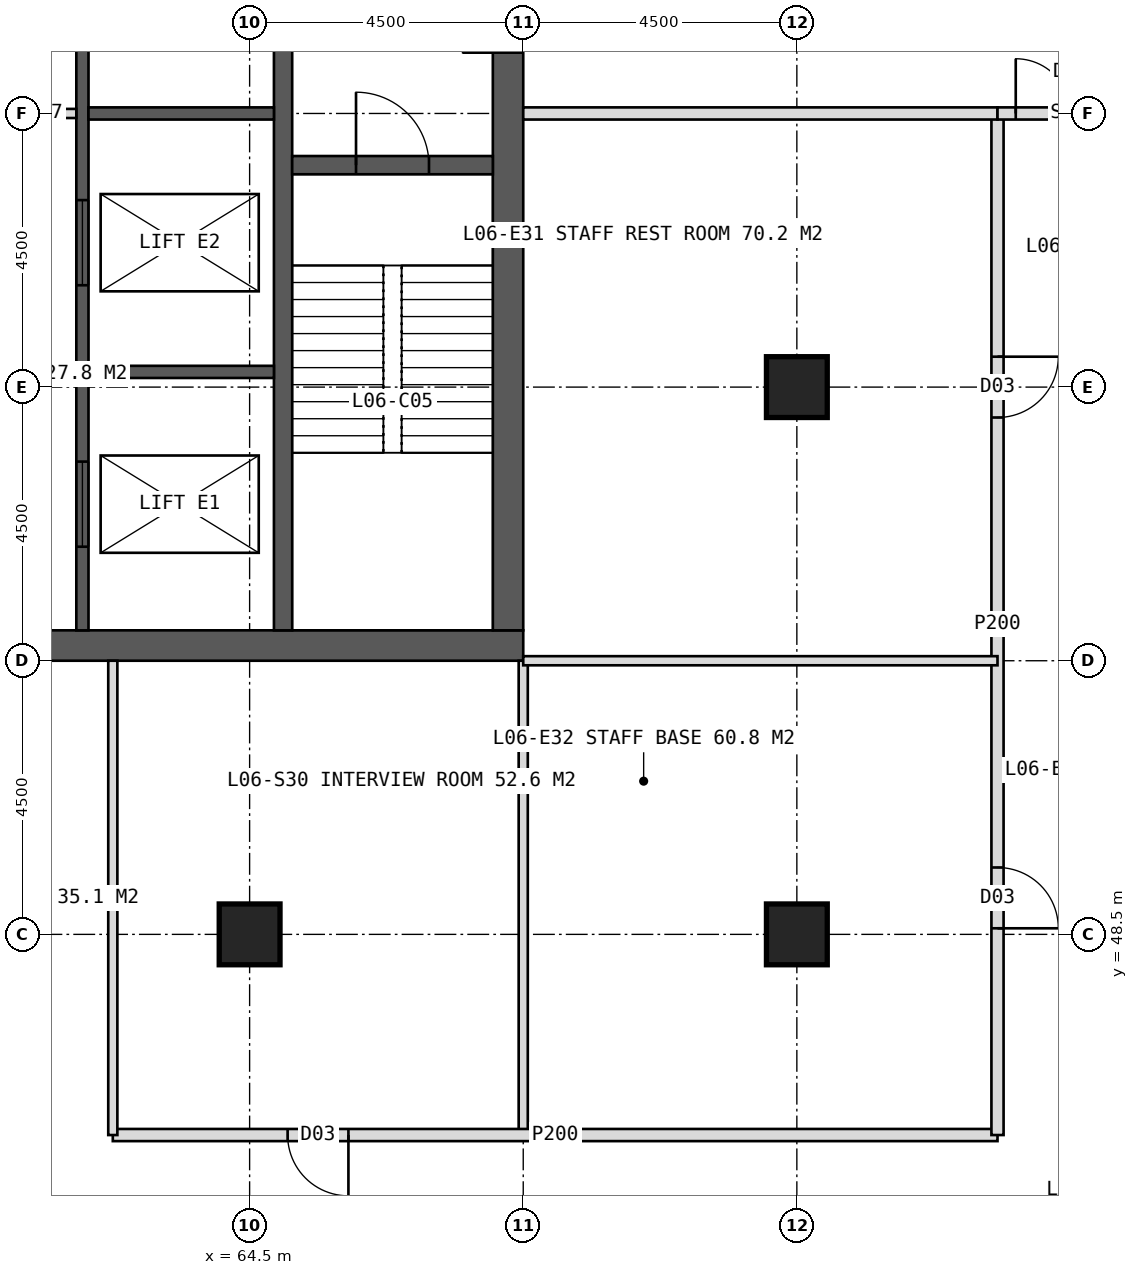
"""IFC4 building model, lengths in metres.
Left out: names, types, materials, properties, quantities, classifications, styles, units other than length and angle.
Written with IfcOpenShell. Run it as: python <this file> out.ifc"""

import sys

from ifc_helpers import new_model, si_unit, direction, frame, frame_2d, origin, origin_2d, place, context, subcontext, project, spatial, rectangle, hollow_rectangle, extrude, element, fill, save


model = new_model("IFC4")
c1 = context("Model", 3, precision=1e-05, world=origin(), true_north=direction((0.0, 1.0)))
c2 = subcontext(c1, "Body", "Model", "MODEL_VIEW")
j1 = project(units=[si_unit("LENGTHUNIT", "METRE"), si_unit("PLANEANGLEUNIT", "RADIAN")], contexts=[c1])
p1 = place(None, origin())
s1 = spatial("IfcSite", under=j1, at=p1, CompositionType="ELEMENT")
p2 = place(p1, origin())
s2 = spatial("IfcBuilding", under=s1, at=p2, CompositionType="ELEMENT")
p3 = place(p2, frame((0.0, 0.0, 31.0)))
s3 = spatial("IfcBuildingStorey", under=s2, at=p3, CompositionType="ELEMENT", Elevation=31.0)
p4 = place(p3, frame((51.0, 53.25, 0.0), z_axis=(0.0, 0.0, 1.0), x_axis=(1.0, 0.0, 0.0)))
e1 = element("IfcWall", 1, at=p4, inside=s3, PredefinedType="SHEAR", context=c2, shape_type="SweptSolid", body=[
    extrude(rectangle(XDim=18.0, YDim=0.5, at=frame_2d((9.0, 0.0))), origin(), (0.0, 0.0, 1.0), 4.0),
])
p5 = place(p4, frame((8.1, 0.0, 0.0)))
e2 = element("IfcOpeningElement", 2, at=p5, cuts=e1, PredefinedType="OPENING", context=c2, shape_type="SweptSolid", body=[
    extrude(rectangle(XDim=1.8, YDim=2.2, at=frame_2d((0.9, 1.1))), frame((0.0, 0.26, 0.0), z_axis=(0.0, -1.0, 0.0), x_axis=(1.0, 0.0, 0.0)), (0.0, 0.0, 1.0), 0.52),
])
p6 = place(p3, frame((68.75, 53.5, 0.0), z_axis=(0.0, 0.0, 1.0), x_axis=(0.0, 1.0, 0.0)))
e3 = element("IfcWall", 3, at=p6, inside=s3, PredefinedType="SHEAR", context=c2, shape_type="SweptSolid", body=[
    extrude(rectangle(XDim=17.0, YDim=0.5, at=frame_2d((8.5, 0.0))), origin(), (0.0, 0.0, 1.0), 4.0),
])
p7 = place(p6, frame((9.5, 0.0, 0.0)))
e4 = element("IfcOpeningElement", 4, at=p7, cuts=e3, PredefinedType="OPENING", context=c2, shape_type="SweptSolid", body=[
    extrude(rectangle(XDim=1.5, YDim=2.2, at=frame_2d((0.75, 1.1))), frame((0.0, 0.26, 0.0), z_axis=(0.0, -1.0, 0.0), x_axis=(1.0, 0.0, 0.0)), (0.0, 0.0, 1.0), 0.52),
])
p8 = place(p3, frame((65.05, 53.5, 0.0), z_axis=(0.0, 0.0, 1.0), x_axis=(0.0, 1.0, 0.0)))
e5 = element("IfcWall", 5, at=p8, inside=s3, PredefinedType="SHEAR", context=c2, shape_type="SweptSolid", body=[
    extrude(rectangle(XDim=17.0, YDim=0.3, at=frame_2d((8.5, 0.0))), origin(), (0.0, 0.0, 1.0), 4.0),
])
p9 = place(p3, frame((61.75, 53.5, 0.0), z_axis=(0.0, 0.0, 1.0), x_axis=(0.0, 1.0, 0.0)))
e6 = element("IfcWall", 6, at=p9, inside=s3, PredefinedType="SHEAR", context=c2, shape_type="SweptSolid", body=[
    extrude(rectangle(XDim=17.0, YDim=0.2, at=frame_2d((8.5, 0.0))), origin(), (0.0, 0.0, 1.0), 4.0),
])
p10 = place(p9, frame((1.375, 0.0, 0.0)))
e7 = element("IfcOpeningElement", 7, at=p10, cuts=e6, PredefinedType="OPENING", context=c2, shape_type="SweptSolid", body=[
    extrude(rectangle(XDim=1.4, YDim=2.2, at=frame_2d((0.7, 1.1))), frame((0.0, 0.11, 0.0), z_axis=(0.0, -1.0, 0.0), x_axis=(1.0, 0.0, 0.0)), (0.0, 0.0, 1.0), 0.22),
])
p11 = place(p9, frame((5.675, 0.0, 0.0)))
e8 = element("IfcOpeningElement", 8, at=p11, cuts=e6, PredefinedType="OPENING", context=c2, shape_type="SweptSolid", body=[
    extrude(rectangle(XDim=1.4, YDim=2.2, at=frame_2d((0.7, 1.1))), frame((0.0, 0.11, 0.0), z_axis=(0.0, -1.0, 0.0), x_axis=(1.0, 0.0, 0.0)), (0.0, 0.0, 1.0), 0.22),
])
for number, where, z_axis, x_axis in (
    (9, (61.85, 57.75, 0.0), (0.0, 0.0, 1.0), (1.0, 0.0, 0.0)),
    (10, (61.85, 62.0, 0.0), (0.0, 0.0, 1.0), (1.0, 0.0, 0.0)),
):
    element("IfcWall", number, at=place(p3, frame(where, z_axis=z_axis, x_axis=x_axis)), inside=s3, PredefinedType="SHEAR", context=c2, shape_type="SweptSolid", body=[
        extrude(rectangle(XDim=3.05, YDim=0.2, at=frame_2d((1.525, 0.0))), origin(), (0.0, 0.0, 1.0), 4.0),
    ])
p12 = place(p3, frame((65.2, 61.15, 0.0), z_axis=(0.0, 0.0, 1.0), x_axis=(1.0, 0.0, 0.0)))
e11 = element("IfcWall", 11, at=p12, inside=s3, PredefinedType="SHEAR", context=c2, shape_type="SweptSolid", body=[
    extrude(rectangle(XDim=3.3, YDim=0.3, at=frame_2d((1.65, 0.0))), origin(), (0.0, 0.0, 1.0), 4.0),
])
p13 = place(p12, frame((1.05, 0.0, 0.0)))
e12 = element("IfcOpeningElement", 12, at=p13, cuts=e11, PredefinedType="OPENING", context=c2, shape_type="SweptSolid", body=[
    extrude(rectangle(XDim=1.2, YDim=2.1, at=frame_2d((0.6, 1.05))), frame((0.0, 0.16, 0.0), z_axis=(0.0, -1.0, 0.0), x_axis=(1.0, 0.0, 0.0)), (0.0, 0.0, 1.0), 0.32),
])
for number, where, z_axis, x_axis in (
    (13, (73.5, 48.5, 0.0), (0.0, 0.0, 1.0), (1.0, 0.0, 0.0)),
    (14, (64.5, 48.5, 0.0), (0.0, 0.0, 1.0), (1.0, 0.0, 0.0)),
    (15, (73.5, 57.5, 0.0), (0.0, 0.0, 1.0), (1.0, 0.0, 0.0)),
):
    element("IfcColumn", number, at=place(p3, frame(where, z_axis=z_axis, x_axis=x_axis)), inside=s3, PredefinedType="COLUMN", context=c2, shape_type="SweptSolid", body=[
        extrude(hollow_rectangle(XDim=1.0, YDim=1.0, WallThickness=0.1, at=origin_2d()), origin(), (0.0, 0.0, 1.0), 4.0),
    ])
p14 = place(p3, frame((69.0, 53.0, 0.0), z_axis=(0.0, 0.0, 1.0), x_axis=(0.0, -1.0, 0.0)))
e16 = element("IfcWall", 16, at=p14, inside=s3, PredefinedType="PARTITIONING", context=c2, shape_type="SweptSolid", body=[
    extrude(rectangle(XDim=7.8, YDim=0.15, at=frame_2d((3.9, 0.0))), origin(), (0.0, 0.0, 1.0), 3.75),
])
p15 = place(p3, frame((76.8, 45.2, 0.0), z_axis=(0.0, 0.0, 1.0), x_axis=(-1.0, 0.0, 0.0)))
e17 = element("IfcWall", 17, at=p15, inside=s3, PredefinedType="PARTITIONING", context=c2, shape_type="SweptSolid", body=[
    extrude(rectangle(XDim=14.55, YDim=0.2, at=frame_2d((7.275, 0.0))), origin(), (0.0, 0.0, 1.0), 3.75),
])
p16 = place(p15, frame((10.675, 0.0, 0.0)))
e18 = element("IfcOpeningElement", 18, at=p16, cuts=e17, PredefinedType="OPENING", context=c2, shape_type="SweptSolid", body=[
    extrude(rectangle(XDim=1.0, YDim=2.1, at=frame_2d((0.5, 1.05))), frame((0.0, 0.11, 0.0), z_axis=(0.0, -1.0, 0.0), x_axis=(1.0, 0.0, 0.0)), (0.0, 0.0, 1.0), 0.22),
])
p17 = place(p3, frame((62.25, 53.0, 0.0), z_axis=(0.0, 0.0, 1.0), x_axis=(0.0, -1.0, 0.0)))
e19 = element("IfcWall", 19, at=p17, inside=s3, PredefinedType="PARTITIONING", context=c2, shape_type="SweptSolid", body=[
    extrude(rectangle(XDim=7.8, YDim=0.15, at=frame_2d((3.9, 0.0))), origin(), (0.0, 0.0, 1.0), 3.75),
])
p18 = place(p3, frame((76.8, 62.0, 0.0), z_axis=(0.0, 0.0, 1.0), x_axis=(0.0, -1.0, 0.0)))
e20 = element("IfcWall", 20, at=p18, inside=s3, PredefinedType="PARTITIONING", context=c2, shape_type="SweptSolid", body=[
    extrude(rectangle(XDim=16.8, YDim=0.2, at=frame_2d((8.4, 0.0))), origin(), (0.0, 0.0, 1.0), 3.75),
])
p19 = place(p18, frame((4.0, 0.0, 0.0)))
e21 = element("IfcOpeningElement", 21, at=p19, cuts=e20, PredefinedType="OPENING", context=c2, shape_type="SweptSolid", body=[
    extrude(rectangle(XDim=1.0, YDim=2.1, at=frame_2d((0.5, 1.05))), frame((0.0, 0.11, 0.0), z_axis=(0.0, -1.0, 0.0), x_axis=(1.0, 0.0, 0.0)), (0.0, 0.0, 1.0), 0.22),
])
p20 = place(p18, frame((12.4, 0.0, 0.0)))
e22 = element("IfcOpeningElement", 22, at=p20, cuts=e20, PredefinedType="OPENING", context=c2, shape_type="SweptSolid", body=[
    extrude(rectangle(XDim=1.0, YDim=2.1, at=frame_2d((0.5, 1.05))), frame((0.0, 0.11, 0.0), z_axis=(0.0, -1.0, 0.0), x_axis=(1.0, 0.0, 0.0)), (0.0, 0.0, 1.0), 0.22),
])
p21 = place(p3, frame((69.0, 62.0, 0.0), z_axis=(0.0, 0.0, 1.0), x_axis=(1.0, 0.0, 0.0)))
e23 = element("IfcWall", 23, at=p21, inside=s3, PredefinedType="SOLIDWALL", context=c2, shape_type="SweptSolid", body=[
    extrude(rectangle(XDim=7.8, YDim=0.2, at=frame_2d((3.9, 0.0))), origin(), (0.0, 0.0, 1.0), 2.75),
])
p22 = place(p3, frame((69.0, 53.0, 0.0), z_axis=(0.0, 0.0, 1.0), x_axis=(1.0, 0.0, 0.0)))
e24 = element("IfcWall", 24, at=p22, inside=s3, PredefinedType="PARTITIONING", context=c2, shape_type="SweptSolid", body=[
    extrude(rectangle(XDim=7.8, YDim=0.15, at=frame_2d((3.9, 0.0))), origin(), (0.0, 0.0, 1.0), 3.75),
])
p23 = place(p3, frame((76.8, 62.0, 0.0), z_axis=(0.0, 0.0, 1.0), x_axis=(1.0, 0.0, 0.0)))
e25 = element("IfcWall", 25, at=p23, inside=s3, PredefinedType="SOLIDWALL", context=c2, shape_type="SweptSolid", body=[
    extrude(rectangle(XDim=2.7, YDim=0.2, at=frame_2d((1.35, 0.0))), origin(), (0.0, 0.0, 1.0), 2.75),
])
p24 = place(p23, frame((0.3, 0.0, 0.0)))
e26 = element("IfcOpeningElement", 26, at=p24, cuts=e25, PredefinedType="OPENING", context=c2, shape_type="SweptSolid", body=[
    extrude(rectangle(XDim=1.8, YDim=2.2, at=frame_2d((0.9, 1.1))), frame((0.0, 0.11, 0.0), z_axis=(0.0, -1.0, 0.0), x_axis=(1.0, 0.0, 0.0)), (0.0, 0.0, 1.0), 0.22),
])
p25 = place(p3, frame((58.35, 62.0, 0.0), z_axis=(0.0, 0.0, 1.0), x_axis=(1.0, 0.0, 0.0)))
e27 = element("IfcWall", 27, at=p25, inside=s3, PredefinedType="PARTITIONING", context=c2, shape_type="SweptSolid", body=[
    extrude(rectangle(XDim=3.3, YDim=0.15, at=frame_2d((1.65, 0.0))), origin(), (0.0, 0.0, 1.0), 3.75),
])
p26 = place(p25, frame((1.15, 0.0, 0.0)))
e28 = element("IfcOpeningElement", 28, at=p26, cuts=e27, PredefinedType="OPENING", context=c2, shape_type="SweptSolid", body=[
    extrude(rectangle(XDim=1.0, YDim=2.1, at=frame_2d((0.5, 1.05))), frame((0.0, 0.085, 0.0), z_axis=(0.0, -1.0, 0.0), x_axis=(1.0, 0.0, 0.0)), (0.0, 0.0, 1.0), 0.17),
])
p27 = place(p16, origin())
e29 = element("IfcDoor", 29, at=p27, inside=s3, OperationType="SINGLE_SWING_LEFT", PredefinedType="DOOR", context=c2, shape_type="SweptSolid", body=[
    extrude(rectangle(XDim=1.0, YDim=2.1, at=frame_2d((0.5, 1.05))), frame((0.0, 0.025, 0.0), z_axis=(0.0, -1.0, 0.0), x_axis=(1.0, 0.0, 0.0)), (0.0, 0.0, 1.0), 0.05),
])
fill(e18, e29)
p28 = place(p19, origin())
e30 = element("IfcDoor", 30, at=p28, inside=s3, OperationType="SINGLE_SWING_LEFT", PredefinedType="DOOR", context=c2, shape_type="SweptSolid", body=[
    extrude(rectangle(XDim=1.0, YDim=2.1, at=frame_2d((0.5, 1.05))), frame((0.0, 0.025, 0.0), z_axis=(0.0, -1.0, 0.0), x_axis=(1.0, 0.0, 0.0)), (0.0, 0.0, 1.0), 0.05),
])
fill(e21, e30)
p29 = place(p20, origin())
e31 = element("IfcDoor", 31, at=p29, inside=s3, OperationType="SINGLE_SWING_RIGHT", PredefinedType="DOOR", context=c2, shape_type="SweptSolid", body=[
    extrude(rectangle(XDim=1.0, YDim=2.1, at=frame_2d((0.5, 1.05))), frame((0.0, 0.025, 0.0), z_axis=(0.0, -1.0, 0.0), x_axis=(1.0, 0.0, 0.0)), (0.0, 0.0, 1.0), 0.05),
])
fill(e22, e31)
p30 = place(p24, origin())
e32 = element("IfcDoor", 32, at=p30, inside=s3, OperationType="DOUBLE_DOOR_DOUBLE_SWING", PredefinedType="DOOR", context=c2, shape_type="SweptSolid", body=[
    extrude(rectangle(XDim=1.8, YDim=2.2, at=frame_2d((0.9, 1.1))), frame((0.0, 0.025, 0.0), z_axis=(0.0, -1.0, 0.0), x_axis=(1.0, 0.0, 0.0)), (0.0, 0.0, 1.0), 0.05),
])
fill(e26, e32)
p31 = place(p13, origin())
e33 = element("IfcDoor", 33, at=p31, inside=s3, OperationType="SINGLE_SWING_LEFT", PredefinedType="DOOR", context=c2, shape_type="SweptSolid", body=[
    extrude(rectangle(XDim=1.2, YDim=2.1, at=frame_2d((0.6, 1.05))), frame((0.0, 0.025, 0.0), z_axis=(0.0, -1.0, 0.0), x_axis=(1.0, 0.0, 0.0)), (0.0, 0.0, 1.0), 0.05),
])
fill(e12, e33)
p32 = place(p10, origin())
e34 = element("IfcDoor", 34, at=p32, inside=s3, OperationType="SLIDING_TO_LEFT", PredefinedType="DOOR", context=c2, shape_type="SweptSolid", body=[
    extrude(rectangle(XDim=1.4, YDim=2.2, at=frame_2d((0.7, 1.1))), frame((0.0, 0.025, 0.0), z_axis=(0.0, -1.0, 0.0), x_axis=(1.0, 0.0, 0.0)), (0.0, 0.0, 1.0), 0.05),
])
fill(e7, e34)
p33 = place(p11, origin())
e35 = element("IfcDoor", 35, at=p33, inside=s3, OperationType="SLIDING_TO_LEFT", PredefinedType="DOOR", context=c2, shape_type="SweptSolid", body=[
    extrude(rectangle(XDim=1.4, YDim=2.2, at=frame_2d((0.7, 1.1))), frame((0.0, 0.025, 0.0), z_axis=(0.0, -1.0, 0.0), x_axis=(1.0, 0.0, 0.0)), (0.0, 0.0, 1.0), 0.05),
])
fill(e8, e35)
save(model, sys.argv[1])
